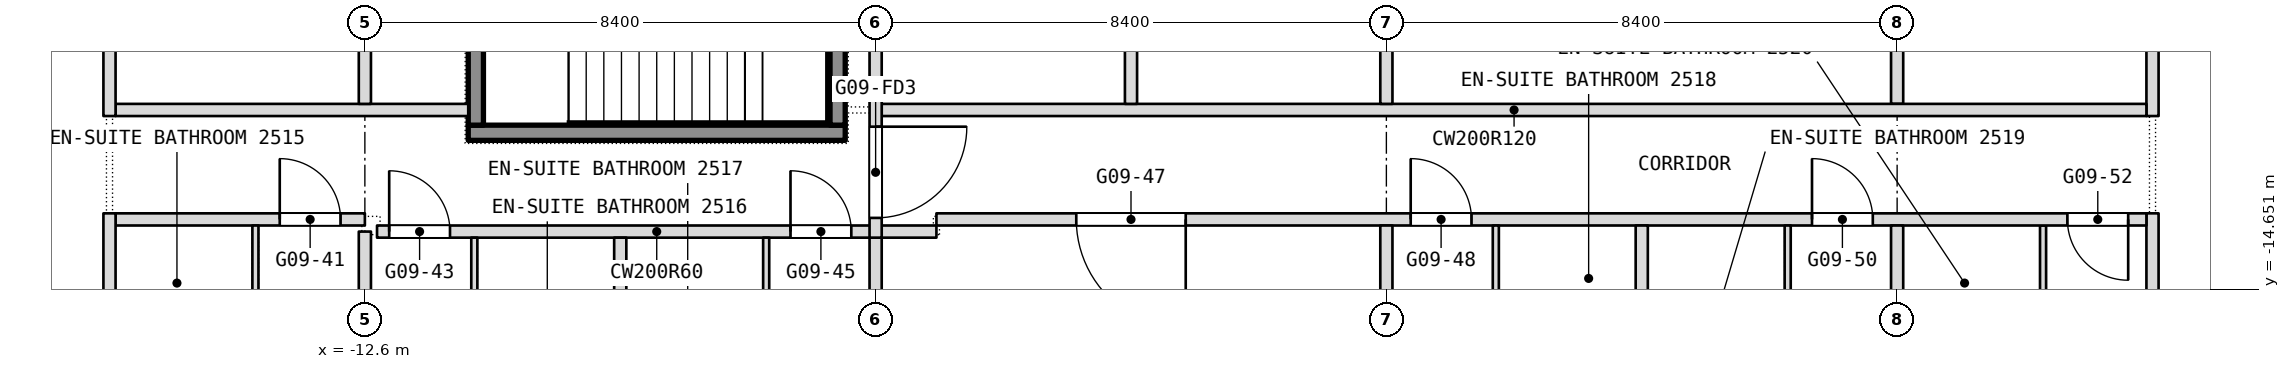
"""IFC4 building model, lengths in metres.
Left out: names, types, materials, properties, quantities, classifications, styles, units other than length and angle.
Written with IfcOpenShell. Run it as: python <this file> out.ifc"""

import sys

from ifc_helpers import new_model, si_unit, direction, frame, frame_2d, origin, place, context, subcontext, project, spatial, rectangle, extrude, element, fill, save


model = new_model("IFC4")
c1 = context("Model", 3, precision=1e-05, world=origin(), true_north=direction((0.0, 1.0)))
c2 = subcontext(c1, "Body", "Model", "MODEL_VIEW")
j1 = project(units=[si_unit("LENGTHUNIT", "METRE"), si_unit("PLANEANGLEUNIT", "RADIAN")], contexts=[c1])
p1 = place(None, origin())
s1 = spatial("IfcSite", under=j1, at=p1, CompositionType="ELEMENT")
p2 = place(p1, origin())
s2 = spatial("IfcBuilding", under=s1, at=p2, CompositionType="ELEMENT")
p3 = place(p2, frame((0.0, 0.0, 115.7)))
s3 = spatial("IfcBuildingStorey", under=s2, at=p3, CompositionType="ELEMENT", Elevation=115.7)
p4 = place(p3, frame((16.8, -22.186, 0.0), z_axis=(0.0, 0.0, 1.0), x_axis=(0.0, 1.0, 0.0)))
e1 = element("IfcWall", 1, at=p4, inside=s3, PredefinedType="PARTITIONING", context=c2, shape_type="SweptSolid", body=[
    extrude(rectangle(XDim=8.786, YDim=0.2, at=frame_2d((4.393, 0.0))), origin(), (0.0, 0.0, 1.0), 3.34),
])
p5 = place(p3, frame((16.8, -11.8, 0.0), z_axis=(0.0, 0.0, 1.0), x_axis=(0.0, 1.0, 0.0)))
e2 = element("IfcWall", 2, at=p5, inside=s3, PredefinedType="PARTITIONING", context=c2, shape_type="SweptSolid", body=[
    extrude(rectangle(XDim=9.9, YDim=0.2, at=frame_2d((4.95, 0.0))), origin(), (0.0, 0.0, 1.0), 3.34),
])
p6 = place(p3, frame((15.0, -16.45, 0.0), z_axis=(0.0, 0.0, 1.0), x_axis=(0.0, 1.0, 0.0)))
e3 = element("IfcWall", 3, at=p6, inside=s3, PredefinedType="PARTITIONING", context=c2, shape_type="SweptSolid", body=[
    extrude(rectangle(XDim=2.85, YDim=0.1, at=frame_2d((1.425, 0.0))), origin(), (0.0, 0.0, 1.0), 3.34),
])
p7 = place(p3, frame((-12.4, -13.7, 0.0), z_axis=(0.0, 0.0, 1.0), x_axis=(1.0, 0.0, 0.0)))
e4 = element("IfcWall", 4, at=p7, inside=s3, PredefinedType="PARTITIONING", context=c2, shape_type="SweptSolid", body=[
    extrude(rectangle(XDim=9.2, YDim=0.2, at=frame_2d((4.6, 0.0))), origin(), (0.0, 0.0, 1.0), 3.34),
])
p8 = place(p7, frame((0.2, 0.0, 0.0)))
e5 = element("IfcOpeningElement", 5, at=p8, cuts=e4, PredefinedType="OPENING", context=c2, shape_type="SweptSolid", body=[
    extrude(rectangle(XDim=1.0, YDim=2.1, at=frame_2d((0.5, 1.05))), frame((0.0, 0.1, 0.0), z_axis=(0.0, -1.0, 0.0), x_axis=(1.0, 0.0, 0.0)), (0.0, 0.0, 1.0), 0.2),
])
p9 = place(p7, frame((6.8, 0.0, 0.0)))
e6 = element("IfcOpeningElement", 6, at=p9, cuts=e4, PredefinedType="OPENING", context=c2, shape_type="SweptSolid", body=[
    extrude(rectangle(XDim=1.0, YDim=2.1, at=frame_2d((0.5, 1.05))), frame((0.0, 0.1, 0.0), z_axis=(0.0, -1.0, 0.0), x_axis=(1.0, 0.0, 0.0)), (0.0, 0.0, 1.0), 0.2),
])
p10 = place(p3, frame((-16.7, -13.5, 0.0), z_axis=(0.0, 0.0, 1.0), x_axis=(1.0, 0.0, 0.0)))
e7 = element("IfcWall", 7, at=p10, inside=s3, PredefinedType="PARTITIONING", context=c2, shape_type="SweptSolid", body=[
    extrude(rectangle(XDim=4.1, YDim=0.2, at=frame_2d((2.05, 0.0))), origin(), (0.0, 0.0, 1.0), 3.34),
])
p11 = place(p10, frame((2.7, 0.0, 0.0)))
e8 = element("IfcOpeningElement", 8, at=p11, cuts=e7, PredefinedType="OPENING", context=c2, shape_type="SweptSolid", body=[
    extrude(rectangle(XDim=1.0, YDim=2.1, at=frame_2d((0.5, 1.05))), frame((0.0, 0.1, 0.0), z_axis=(0.0, -1.0, 0.0), x_axis=(1.0, 0.0, 0.0)), (0.0, 0.0, 1.0), 0.2),
])
p12 = place(p3, frame((-3.2, -13.5, 0.0), z_axis=(0.0, 0.0, 1.0), x_axis=(1.0, 0.0, 0.0)))
e9 = element("IfcWall", 9, at=p12, inside=s3, PredefinedType="PARTITIONING", context=c2, shape_type="SweptSolid", body=[
    extrude(rectangle(XDim=19.9, YDim=0.2, at=frame_2d((9.95, 0.0))), origin(), (0.0, 0.0, 1.0), 3.34),
])
p13 = place(p12, frame((2.3, 0.0, 0.0)))
e10 = element("IfcOpeningElement", 10, at=p13, cuts=e9, PredefinedType="OPENING", context=c2, shape_type="SweptSolid", body=[
    extrude(rectangle(XDim=1.8, YDim=2.1, at=frame_2d((0.9, 1.05))), frame((0.0, 0.1, 0.0), z_axis=(0.0, -1.0, 0.0), x_axis=(1.0, 0.0, 0.0)), (0.0, 0.0, 1.0), 0.2),
])
p14 = place(p12, frame((7.8, 0.0, 0.0)))
e11 = element("IfcOpeningElement", 11, at=p14, cuts=e9, PredefinedType="OPENING", context=c2, shape_type="SweptSolid", body=[
    extrude(rectangle(XDim=1.0, YDim=2.1, at=frame_2d((0.5, 1.05))), frame((0.0, 0.1, 0.0), z_axis=(0.0, -1.0, 0.0), x_axis=(1.0, 0.0, 0.0)), (0.0, 0.0, 1.0), 0.2),
])
p15 = place(p12, frame((14.4, 0.0, 0.0)))
e12 = element("IfcOpeningElement", 12, at=p15, cuts=e9, PredefinedType="OPENING", context=c2, shape_type="SweptSolid", body=[
    extrude(rectangle(XDim=1.0, YDim=2.1, at=frame_2d((0.5, 1.05))), frame((0.0, 0.1, 0.0), z_axis=(0.0, -1.0, 0.0), x_axis=(1.0, 0.0, 0.0)), (0.0, 0.0, 1.0), 0.2),
])
p16 = place(p12, frame((18.6, 0.0, 0.0)))
e13 = element("IfcOpeningElement", 13, at=p16, cuts=e9, PredefinedType="OPENING", context=c2, shape_type="SweptSolid", body=[
    extrude(rectangle(XDim=1.0, YDim=2.1, at=frame_2d((0.5, 1.05))), frame((0.0, 0.1, 0.0), z_axis=(0.0, -1.0, 0.0), x_axis=(1.0, 0.0, 0.0)), (0.0, 0.0, 1.0), 0.2),
])
p17 = place(p3, frame((12.6, -21.175, 0.0), z_axis=(0.0, 0.0, 1.0), x_axis=(0.0, 1.0, 0.0)))
e14 = element("IfcWall", 14, at=p17, inside=s3, PredefinedType="PARTITIONING", context=c2, shape_type="SweptSolid", body=[
    extrude(rectangle(XDim=7.575, YDim=0.2, at=frame_2d((3.788, 0.0))), origin(), (0.0, 0.0, 1.0), 3.34),
])
p18 = place(p3, frame((12.6, -11.6, 0.0), z_axis=(0.0, 0.0, 1.0), x_axis=(0.0, 1.0, 0.0)))
e15 = element("IfcWall", 15, at=p18, inside=s3, PredefinedType="PARTITIONING", context=c2, shape_type="SweptSolid", body=[
    extrude(rectangle(XDim=3.9, YDim=0.2, at=frame_2d((1.95, 0.0))), origin(), (0.0, 0.0, 1.0), 3.34),
])
p19 = place(p3, frame((-16.7, -11.7, 0.0), z_axis=(0.0, 0.0, 1.0), x_axis=(1.0, 0.0, 0.0)))
e16 = element("IfcWall", 16, at=p19, inside=s3, PredefinedType="PARTITIONING", context=c2, shape_type="SweptSolid", body=[
    extrude(rectangle(XDim=5.8, YDim=0.2, at=frame_2d((2.9, 0.0))), origin(), (0.0, 0.0, 1.0), 3.34),
])
p20 = place(p3, frame((-4.1, -11.7, 0.0), z_axis=(0.0, 0.0, 1.0), x_axis=(1.0, 0.0, 0.0)))
e17 = element("IfcWall", 17, at=p20, inside=s3, PredefinedType="PARTITIONING", context=c2, shape_type="SweptSolid", body=[
    extrude(rectangle(XDim=20.8, YDim=0.2, at=frame_2d((10.4, 0.0))), origin(), (0.0, 0.0, 1.0), 3.34),
])
p21 = place(p3, frame((10.8, -17.35, 0.0), z_axis=(0.0, 0.0, 1.0), x_axis=(0.0, 1.0, 0.0)))
e18 = element("IfcWall", 18, at=p21, inside=s3, PredefinedType="PARTITIONING", context=c2, shape_type="SweptSolid", body=[
    extrude(rectangle(XDim=3.75, YDim=0.1, at=frame_2d((1.875, 0.0))), origin(), (0.0, 0.0, 1.0), 3.34),
])
p22 = place(p3, frame((8.4, -23.3, 0.0), z_axis=(0.0, 0.0, 1.0), x_axis=(0.0, 1.0, 0.0)))
e19 = element("IfcWall", 19, at=p22, inside=s3, PredefinedType="PARTITIONING", context=c2, shape_type="SweptSolid", body=[
    extrude(rectangle(XDim=9.7, YDim=0.2, at=frame_2d((4.85, 0.0))), origin(), (0.0, 0.0, 1.0), 3.34),
])
p23 = place(p3, frame((6.0, -17.45, 0.0), z_axis=(0.0, 0.0, 1.0), x_axis=(0.0, 1.0, 0.0)))
e20 = element("IfcWall", 20, at=p23, inside=s3, PredefinedType="PARTITIONING", context=c2, shape_type="SweptSolid", body=[
    extrude(rectangle(XDim=3.85, YDim=0.1, at=frame_2d((1.925, 0.0))), origin(), (0.0, 0.0, 1.0), 3.34),
])
p24 = place(p23, frame((1.355, 0.0, 0.0)))
e21 = element("IfcOpeningElement", 21, at=p24, cuts=e20, PredefinedType="OPENING", context=c2, shape_type="SweptSolid", body=[
    extrude(rectangle(XDim=0.9, YDim=2.1, at=frame_2d((0.45, 1.05))), frame((0.0, 0.05, 0.0), z_axis=(0.0, -1.0, 0.0), x_axis=(1.0, 0.0, 0.0)), (0.0, 0.0, 1.0), 0.1),
])
p25 = place(p3, frame((4.2, -23.3, 0.0), z_axis=(0.0, 0.0, 1.0), x_axis=(0.0, 1.0, 0.0)))
e22 = element("IfcWall", 22, at=p25, inside=s3, PredefinedType="PARTITIONING", context=c2, shape_type="SweptSolid", body=[
    extrude(rectangle(XDim=9.7, YDim=0.2, at=frame_2d((4.85, 0.0))), origin(), (0.0, 0.0, 1.0), 3.34),
])
for number, where, z_axis, x_axis in (
    (23, (4.2, -11.6, 0.0), (0.0, 0.0, 1.0), (0.0, 1.0, 0.0)),
    (24, (0.0, -11.6, 0.0), (0.0, 0.0, 1.0), (0.0, 1.0, 0.0)),
):
    element("IfcWall", number, at=place(p3, frame(where, z_axis=z_axis, x_axis=x_axis)), inside=s3, PredefinedType="PARTITIONING", context=c2, shape_type="SweptSolid", body=[
        extrude(rectangle(XDim=9.7, YDim=0.2, at=frame_2d((4.85, 0.0))), origin(), (0.0, 0.0, 1.0), 3.34),
    ])
p26 = place(p3, frame((-4.2, -23.3, 0.0), z_axis=(0.0, 0.0, 1.0), x_axis=(0.0, 1.0, 0.0)))
e25 = element("IfcWall", 25, at=p26, inside=s3, PredefinedType="PARTITIONING", context=c2, shape_type="SweptSolid", body=[
    extrude(rectangle(XDim=9.5, YDim=0.2, at=frame_2d((4.75, 0.0))), origin(), (0.0, 0.0, 1.0), 3.34),
])
p27 = place(p3, frame((-4.2, -13.8, 0.0), z_axis=(0.0, 0.0, 1.0), x_axis=(0.0, 1.0, 0.0)))
e26 = element("IfcWall", 26, at=p27, inside=s3, PredefinedType="PARTITIONING", context=c2, shape_type="SweptSolid", body=[
    extrude(rectangle(XDim=13.8, YDim=0.2, at=frame_2d((6.9, 0.0))), origin(), (0.0, 0.0, 1.0), 3.34),
])
p28 = place(p27, frame((12.15, 0.0, 0.0)))
e27 = element("IfcOpeningElement", 27, at=p28, cuts=e26, PredefinedType="OPENING", context=c2, shape_type="SweptSolid", body=[
    extrude(rectangle(XDim=1.5, YDim=2.1, at=frame_2d((0.75, 1.05))), frame((0.0, 0.1, 0.0), z_axis=(0.0, -1.0, 0.0), x_axis=(1.0, 0.0, 0.0)), (0.0, 0.0, 1.0), 0.2),
])
p29 = place(p27, frame((0.325, 0.0, 0.0)))
e28 = element("IfcOpeningElement", 28, at=p29, cuts=e26, PredefinedType="OPENING", context=c2, shape_type="SweptSolid", body=[
    extrude(rectangle(XDim=1.5, YDim=2.1, at=frame_2d((0.75, 1.05))), frame((0.0, 0.1, 0.0), z_axis=(0.0, -1.0, 0.0), x_axis=(1.0, 0.0, 0.0)), (0.0, 0.0, 1.0), 0.2),
])
p30 = place(p3, frame((-6.0, -16.65, 0.0), z_axis=(0.0, 0.0, 1.0), x_axis=(0.0, 1.0, 0.0)))
e29 = element("IfcWall", 29, at=p30, inside=s3, PredefinedType="PARTITIONING", context=c2, shape_type="SweptSolid", body=[
    extrude(rectangle(XDim=2.85, YDim=0.1, at=frame_2d((1.425, 0.0))), origin(), (0.0, 0.0, 1.0), 3.34),
])
p31 = place(p3, frame((-8.4, -23.3, 0.0), z_axis=(0.0, 0.0, 1.0), x_axis=(0.0, 1.0, 0.0)))
e30 = element("IfcWall", 30, at=p31, inside=s3, PredefinedType="PARTITIONING", context=c2, shape_type="SweptSolid", body=[
    extrude(rectangle(XDim=9.5, YDim=0.2, at=frame_2d((4.75, 0.0))), origin(), (0.0, 0.0, 1.0), 3.34),
])
p32 = place(p3, frame((-10.8, -17.65, 0.0), z_axis=(0.0, 0.0, 1.0), x_axis=(0.0, 1.0, 0.0)))
e31 = element("IfcWall", 31, at=p32, inside=s3, PredefinedType="PARTITIONING", context=c2, shape_type="SweptSolid", body=[
    extrude(rectangle(XDim=3.85, YDim=0.1, at=frame_2d((1.925, 0.0))), origin(), (0.0, 0.0, 1.0), 3.34),
])
p33 = place(p3, frame((-12.6, -21.175, 0.0), z_axis=(0.0, 0.0, 1.0), x_axis=(0.0, 1.0, 0.0)))
e32 = element("IfcWall", 32, at=p33, inside=s3, PredefinedType="PARTITIONING", context=c2, shape_type="SweptSolid", body=[
    extrude(rectangle(XDim=7.475, YDim=0.2, at=frame_2d((3.738, 0.0))), origin(), (0.0, 0.0, 1.0), 3.34),
])
p34 = place(p3, frame((-12.6, -11.6, 0.0), z_axis=(0.0, 0.0, 1.0), x_axis=(0.0, 1.0, 0.0)))
e33 = element("IfcWall", 33, at=p34, inside=s3, PredefinedType="PARTITIONING", context=c2, shape_type="SweptSolid", body=[
    extrude(rectangle(XDim=9.7, YDim=0.2, at=frame_2d((4.85, 0.0))), origin(), (0.0, 0.0, 1.0), 3.34),
])
p35 = place(p3, frame((-14.4, -16.45, 0.0), z_axis=(0.0, 0.0, 1.0), x_axis=(0.0, 1.0, 0.0)))
e34 = element("IfcWall", 34, at=p35, inside=s3, PredefinedType="PARTITIONING", context=c2, shape_type="SweptSolid", body=[
    extrude(rectangle(XDim=2.85, YDim=0.1, at=frame_2d((1.425, 0.0))), origin(), (0.0, 0.0, 1.0), 3.34),
])
p36 = place(p3, frame((-16.8, -22.186, 0.0), z_axis=(0.0, 0.0, 1.0), x_axis=(0.0, 1.0, 0.0)))
e35 = element("IfcWall", 35, at=p36, inside=s3, PredefinedType="PARTITIONING", context=c2, shape_type="SweptSolid", body=[
    extrude(rectangle(XDim=8.786, YDim=0.2, at=frame_2d((4.393, 0.0))), origin(), (0.0, 0.0, 1.0), 3.34),
])
p37 = place(p3, frame((-16.8, -11.8, 0.0), z_axis=(0.0, 0.0, 1.0), x_axis=(0.0, 1.0, 0.0)))
e36 = element("IfcWall", 36, at=p37, inside=s3, PredefinedType="PARTITIONING", context=c2, shape_type="SweptSolid", body=[
    extrude(rectangle(XDim=9.9, YDim=0.2, at=frame_2d((4.95, 0.0))), origin(), (0.0, 0.0, 1.0), 3.34),
])
p38 = place(p3, frame((-10.9, -12.075, 0.1), z_axis=(0.0, 0.0, 1.0), x_axis=(1.0, 0.0, 0.0)))
e37 = element("IfcWall", 37, at=p38, inside=s3, PredefinedType="SHEAR", context=c2, shape_type="SweptSolid", body=[
    extrude(rectangle(XDim=6.2, YDim=0.25, at=frame_2d((3.1, 0.0))), origin(), (0.0, 0.0, 1.0), 3.6),
])
for number, where, z_axis, x_axis in (
    (38, (-10.775, -11.95, 0.1), (0.0, 0.0, 1.0), (0.0, 1.0, 0.0)),
    (39, (-4.825, -11.95, 0.1), (0.0, 0.0, 1.0), (0.0, 1.0, 0.0)),
):
    element("IfcWall", number, at=place(p3, frame(where, z_axis=z_axis, x_axis=x_axis)), inside=s3, PredefinedType="SHEAR", context=c2, shape_type="SweptSolid", body=[
        extrude(rectangle(XDim=2.9, YDim=0.25, at=frame_2d((1.45, 0.0))), origin(), (0.0, 0.0, 1.0), 3.6),
    ])
p39 = place(p8, origin())
e40 = element("IfcDoor", 40, at=p39, inside=s3, OperationType="SINGLE_SWING_RIGHT", PredefinedType="DOOR", context=c2, shape_type="SweptSolid", body=[
    extrude(rectangle(XDim=1.0, YDim=2.1, at=frame_2d((0.5, 1.05))), frame((0.0, 0.025, 0.0), z_axis=(0.0, -1.0, 0.0), x_axis=(1.0, 0.0, 0.0)), (0.0, 0.0, 1.0), 0.05),
])
fill(e5, e40)
p40 = place(p9, origin())
e41 = element("IfcDoor", 41, at=p40, inside=s3, OperationType="SINGLE_SWING_LEFT", PredefinedType="DOOR", context=c2, shape_type="SweptSolid", body=[
    extrude(rectangle(XDim=1.0, YDim=2.1, at=frame_2d((0.5, 1.05))), frame((0.0, 0.025, 0.0), z_axis=(0.0, -1.0, 0.0), x_axis=(1.0, 0.0, 0.0)), (0.0, 0.0, 1.0), 0.05),
])
fill(e6, e41)
p41 = place(p11, origin())
e42 = element("IfcDoor", 42, at=p41, inside=s3, OperationType="SINGLE_SWING_LEFT", PredefinedType="DOOR", context=c2, shape_type="SweptSolid", body=[
    extrude(rectangle(XDim=1.0, YDim=2.1, at=frame_2d((0.5, 1.05))), frame((0.0, 0.025, 0.0), z_axis=(0.0, -1.0, 0.0), x_axis=(1.0, 0.0, 0.0)), (0.0, 0.0, 1.0), 0.05),
])
fill(e8, e42)
p42 = place(p13, origin())
e43 = element("IfcDoor", 43, at=p42, inside=s3, OperationType="DOUBLE_DOOR_SINGLE_SWING", PredefinedType="DOOR", context=c2, shape_type="SweptSolid", body=[
    extrude(rectangle(XDim=1.8, YDim=2.1, at=frame_2d((0.9, 1.05))), frame((0.0, 0.025, 0.0), z_axis=(0.0, -1.0, 0.0), x_axis=(1.0, 0.0, 0.0)), (0.0, 0.0, 1.0), 0.05),
])
fill(e10, e43)
p43 = place(p14, origin())
e44 = element("IfcDoor", 44, at=p43, inside=s3, OperationType="SINGLE_SWING_RIGHT", PredefinedType="DOOR", context=c2, shape_type="SweptSolid", body=[
    extrude(rectangle(XDim=1.0, YDim=2.1, at=frame_2d((0.5, 1.05))), frame((0.0, 0.025, 0.0), z_axis=(0.0, -1.0, 0.0), x_axis=(1.0, 0.0, 0.0)), (0.0, 0.0, 1.0), 0.05),
])
fill(e11, e44)
p44 = place(p15, origin())
e45 = element("IfcDoor", 45, at=p44, inside=s3, OperationType="SINGLE_SWING_RIGHT", PredefinedType="DOOR", context=c2, shape_type="SweptSolid", body=[
    extrude(rectangle(XDim=1.0, YDim=2.1, at=frame_2d((0.5, 1.05))), frame((0.0, 0.025, 0.0), z_axis=(0.0, -1.0, 0.0), x_axis=(1.0, 0.0, 0.0)), (0.0, 0.0, 1.0), 0.05),
])
fill(e12, e45)
p45 = place(p16, origin())
e46 = element("IfcDoor", 46, at=p45, inside=s3, OperationType="SINGLE_SWING_LEFT", PredefinedType="DOOR", context=c2, shape_type="SweptSolid", body=[
    extrude(rectangle(XDim=1.0, YDim=2.1, at=frame_2d((0.5, 1.05))), frame((0.0, 0.025, 0.0), z_axis=(0.0, -1.0, 0.0), x_axis=(1.0, 0.0, 0.0)), (0.0, 0.0, 1.0), 0.05),
])
fill(e13, e46)
p46 = place(p29, origin())
e47 = element("IfcDoor", 47, at=p46, inside=s3, OperationType="DOUBLE_DOOR_DOUBLE_SWING", PredefinedType="DOOR", context=c2, shape_type="SweptSolid", body=[
    extrude(rectangle(XDim=1.5, YDim=2.1, at=frame_2d((0.75, 1.05))), frame((0.0, 0.025, 0.0), z_axis=(0.0, -1.0, 0.0), x_axis=(1.0, 0.0, 0.0)), (0.0, 0.0, 1.0), 0.05),
])
fill(e28, e47)
save(model, sys.argv[1])
